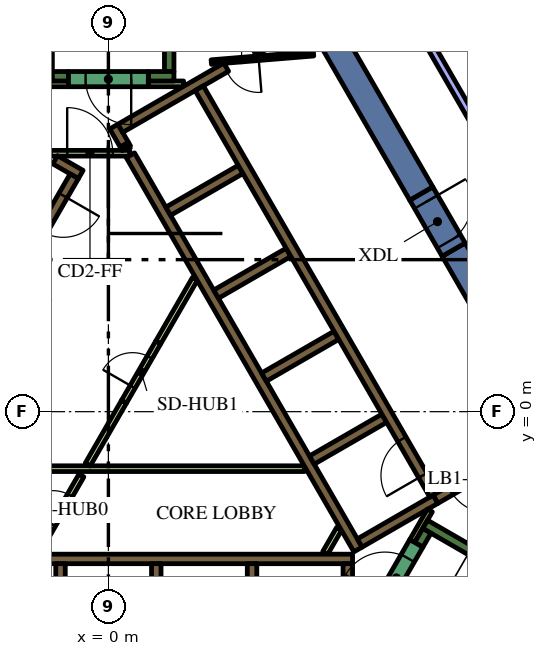
"""IFC4 building model, lengths in metres.
Left out: names, types, materials, properties, quantities, classifications, styles, units other than length and angle.
Written with IfcOpenShell. Run it as: python <this file> out.ifc"""

import sys

from ifc_helpers import new_model, si_unit, direction, frame, frame_2d, origin, place, context, subcontext, project, spatial, rectangle, extrude, element, fill, save


model = new_model("IFC4")
c1 = context("Model", 3, precision=1e-05, world=origin(), true_north=direction((0.0, 1.0)))
c2 = subcontext(c1, "Body", "Model", "MODEL_VIEW")
j1 = project(units=[si_unit("LENGTHUNIT", "METRE"), si_unit("PLANEANGLEUNIT", "RADIAN")], contexts=[c1])
p1 = place(None, origin())
s1 = spatial("IfcSite", under=j1, at=p1, CompositionType="ELEMENT")
p2 = place(p1, origin())
s2 = spatial("IfcBuilding", under=s1, at=p2, CompositionType="ELEMENT")
p3 = place(p2, frame((0.0, 0.0, 247.8)))
s3 = spatial("IfcBuildingStorey", under=s2, at=p3, CompositionType="ELEMENT", Elevation=247.8)
for number, where, z_axis, x_axis in (
    (1, (9.085, 4.264, 0.0), (0.0, 0.0, 1.0), (0.5, -0.866, 0.0)),
    (2, (8.235, 5.736, 0.0), (0.0, 0.0, 1.0), (-0.5, 0.866, 0.0)),
):
    element("IfcWall", number, at=place(p3, frame(where, z_axis=z_axis, x_axis=x_axis)), inside=s3, PredefinedType="SOLIDWALL", context=c2, shape_type="SweptSolid", body=[
        extrude(rectangle(XDim=12.472, YDim=0.7, at=frame_2d((6.236, 0.0))), origin(), (0.0, 0.0, 1.0), 4.2),
    ])
p4 = place(p3, frame((8.334, -2.964, 0.0), z_axis=(0.0, 0.0, 1.0), x_axis=(0.866016039709, -0.500016218704, 0.0)))
e3 = element("IfcWall", 3, at=p4, inside=s3, PredefinedType="SOLIDWALL", context=c2, shape_type="SweptSolid", body=[
    extrude(rectangle(XDim=7.05, YDim=0.25, at=frame_2d((3.525, 0.0))), origin(), (0.0, 0.0, 1.0), 4.2),
])
p5 = place(p3, frame((8.168, -3.503, 0.0), z_axis=(0.0, 0.0, 1.0), x_axis=(0.49972245349, 0.866185586049, 0.0)))
e4 = element("IfcWall", 4, at=p5, inside=s3, PredefinedType="SOLIDWALL", context=c2, shape_type="SweptSolid", body=[
    extrude(rectangle(XDim=0.425, YDim=0.25, at=frame_2d((0.212, 0.0))), origin(), (0.0, 0.0, 1.0), 4.2),
])
p6 = place(p3, frame((1.6, 8.95, 0.0), z_axis=(0.0, 0.0, 1.0), x_axis=(0.0, 1.0, 0.0)))
e5 = element("IfcWall", 5, at=p6, inside=s3, PredefinedType="SOLIDWALL", context=c2, shape_type="SweptSolid", body=[
    extrude(rectangle(XDim=6.8, YDim=0.25, at=frame_2d((3.4, 0.0))), origin(), (0.0, 0.0, 1.0), 4.2),
])
p7 = place(p3, frame((1.05, 8.825, 0.0), z_axis=(0.0, 0.0, 1.0), x_axis=(1.0, 0.0, 0.0)))
e6 = element("IfcWall", 6, at=p7, inside=s3, PredefinedType="SOLIDWALL", context=c2, shape_type="SweptSolid", body=[
    extrude(rectangle(XDim=0.675, YDim=0.25, at=frame_2d((0.337, 0.0))), origin(), (0.0, 0.0, 1.0), 4.2),
])
p8 = place(p3, frame((-1.6, 8.7, 0.0), z_axis=(0.0, 0.0, 1.0), x_axis=(0.0, 1.0, 0.0)))
e7 = element("IfcWall", 7, at=p8, inside=s3, PredefinedType="SOLIDWALL", context=c2, shape_type="SweptSolid", body=[
    extrude(rectangle(XDim=7.05, YDim=0.25, at=frame_2d((3.525, 0.0))), origin(), (0.0, 0.0, 1.0), 4.2),
])
p9 = place(p3, frame((-1.475, 8.825, 0.0), z_axis=(0.0, 0.0, 1.0), x_axis=(1.0, 0.0, 0.0)))
e8 = element("IfcWall", 8, at=p9, inside=s3, PredefinedType="SOLIDWALL", context=c2, shape_type="SweptSolid", body=[
    extrude(rectangle(XDim=0.425, YDim=0.25, at=frame_2d((0.212, 0.0))), origin(), (0.0, 0.0, 1.0), 4.2),
])
p10 = place(p3, frame((-5.545, -3.875, 0.0), z_axis=(0.0, 0.0, 1.0), x_axis=(1.0, 0.0, 0.0)))
e9 = element("IfcWall", 9, at=p10, inside=s3, PredefinedType="SOLIDWALL", context=c2, shape_type="SweptSolid", body=[
    extrude(rectangle(XDim=11.97, YDim=0.25, at=frame_2d((5.985, 0.0))), origin(), (0.0, 0.0, 1.0), 4.2),
])
p11 = place(p3, frame((6.3, -7.24, 0.0), z_axis=(0.0, 0.0, 1.0), x_axis=(0.0, 1.0, 0.0)))
e10 = element("IfcWall", 10, at=p11, inside=s3, PredefinedType="SOLIDWALL", context=c2, shape_type="SweptSolid", body=[
    extrude(rectangle(XDim=3.24, YDim=0.25, at=frame_2d((1.62, 0.0))), origin(), (0.0, 0.0, 1.0), 4.2),
])
for number, where, z_axis, x_axis in (
    (11, (3.78, -4.0, 0.0), (0.0, 0.0, 1.0), (0.0, -1.0, 0.0)),
    (12, (1.26, -4.0, 0.0), (0.0, 0.0, 1.0), (0.0, -1.0, 0.0)),
    (13, (-1.26, -4.0, 0.0), (0.0, 0.0, 1.0), (0.0, -1.0, 0.0)),
):
    element("IfcWall", number, at=place(p3, frame(where, z_axis=z_axis, x_axis=x_axis)), inside=s3, PredefinedType="SOLIDWALL", context=c2, shape_type="SweptSolid", body=[
        extrude(rectangle(XDim=2.2, YDim=0.25, at=frame_2d((1.1, 0.0))), origin(), (0.0, 0.0, 1.0), 4.2),
    ])
p12 = place(p3, frame((0.473, 6.93, 0.0), z_axis=(0.0, 0.0, 1.0), x_axis=(-0.49972245349, 0.866185586049, 0.0)))
e14 = element("IfcWall", 14, at=p12, inside=s3, PredefinedType="SOLIDWALL", context=c2, shape_type="SweptSolid", body=[
    extrude(rectangle(XDim=0.11, YDim=0.25, at=frame_2d((0.055, 0.0))), origin(), (0.0, 0.0, 1.0), 4.2),
])
p13 = place(p3, frame((6.568, -3.627, 0.0), z_axis=(0.0, 0.0, 1.0), x_axis=(-0.499999455981, 0.866025717874, 0.0)))
e15 = element("IfcWall", 15, at=p13, inside=s3, PredefinedType="SOLIDWALL", context=c2, shape_type="SweptSolid", body=[
    extrude(rectangle(XDim=11.978, YDim=0.25, at=frame_2d((5.989, 0.0))), origin(), (0.0, 0.0, 1.0), 4.2),
])
p14 = place(p3, frame((0.417, 7.027, 0.0), z_axis=(0.0, 0.0, 1.0), x_axis=(-0.500210807569, 0.865903659763, 0.0)))
e16 = element("IfcWall", 16, at=p14, inside=s3, PredefinedType="SOLIDWALL", context=c2, shape_type="SweptSolid", body=[
    extrude(rectangle(XDim=0.548, YDim=0.25, at=frame_2d((0.274, 0.0))), origin(), (0.0, 0.0, 1.0), 4.2),
])
p15 = place(p3, frame((3.1, 9.064, 0.0), z_axis=(0.0, 0.0, 1.0), x_axis=(-0.866030133475, -0.499991807846, 0.0)))
e17 = element("IfcWall", 17, at=p15, inside=s3, PredefinedType="SOLIDWALL", context=c2, shape_type="SweptSolid", body=[
    extrude(rectangle(XDim=3.217, YDim=0.25, at=frame_2d((1.608, 0.0))), origin(), (0.0, 0.0, 1.0), 4.2),
])
p16 = place(p3, frame((1.574, 5.274, 0.0), z_axis=(0.0, 0.0, 1.0), x_axis=(0.866028486751, 0.499994660107, 0.0)))
e18 = element("IfcWall", 18, at=p16, inside=s3, PredefinedType="SOLIDWALL", context=c2, shape_type="SweptSolid", body=[
    extrude(rectangle(XDim=2.2, YDim=0.25, at=frame_2d((1.1, 0.0))), origin(), (0.0, 0.0, 1.0), 4.2),
])
for number, where, z_axis, x_axis in (
    (19, (2.834, 3.091, 0.0), (0.0, 0.0, 1.0), (0.866, 0.5, 0.0)),
    (20, (4.094, 0.909, 0.0), (0.0, 0.0, 1.0), (0.866, 0.5, 0.0)),
    (21, (5.354, -1.274, 0.0), (0.0, 0.0, 1.0), (0.866, 0.5, 0.0)),
):
    element("IfcWall", number, at=place(p3, frame(where, z_axis=z_axis, x_axis=x_axis)), inside=s3, PredefinedType="SOLIDWALL", context=c2, shape_type="SweptSolid", body=[
        extrude(rectangle(XDim=2.2, YDim=0.25, at=frame_2d((1.1, 0.0))), origin(), (0.0, 0.0, 1.0), 4.2),
    ])
p17 = place(p3, frame((6.614, -3.456, 0.0), z_axis=(0.0, 0.0, 1.0), x_axis=(0.866025089694, 0.500000544019, 0.0)))
e22 = element("IfcWall", 22, at=p17, inside=s3, PredefinedType="SOLIDWALL", context=c2, shape_type="SweptSolid", body=[
    extrude(rectangle(XDim=2.305, YDim=0.25, at=frame_2d((1.153, 0.0))), origin(), (0.0, 0.0, 1.0), 4.2),
])
p18 = place(p3, frame((3.83, 9.486, 0.0), z_axis=(0.0, 0.0, 1.0), x_axis=(0.865986202621, 0.500067892261, 0.0)))
e23 = element("IfcWall", 23, at=p18, inside=s3, PredefinedType="SOLIDWALL", context=c2, shape_type="SweptSolid", body=[
    extrude(rectangle(XDim=1.591, YDim=0.25, at=frame_2d((0.795, 0.0))), origin(), (0.0, 0.0, 1.0), 4.2),
])
p19 = place(p3, frame((-0.728, 6.24, 0.0), z_axis=(0.0, 0.0, 1.0), x_axis=(-0.865955664968, 0.500120771724, 0.0)))
e24 = element("IfcWall", 24, at=p19, inside=s3, PredefinedType="SOLIDWALL", context=c2, shape_type="SweptSolid", body=[
    extrude(rectangle(XDim=0.778, YDim=0.25, at=frame_2d((0.389, 0.0))), origin(), (0.0, 0.0, 1.0), 4.2),
])
p20 = place(p3, frame((1.05, 8.625, 0.0), z_axis=(0.0, 0.0, 1.0), x_axis=(1.0, 0.0, 0.0)))
e25 = element("IfcWall", 25, at=p20, inside=s3, PredefinedType="PARTITIONING", context=c2, shape_type="SweptSolid", body=[
    extrude(rectangle(XDim=0.929, YDim=0.15, at=frame_2d((0.464, 0.0))), origin(), (0.0, 0.0, 1.0), 3.45),
])
p21 = place(p3, frame((-1.564, 8.625, 0.0), z_axis=(0.0, 0.0, 1.0), x_axis=(1.0, 0.0, 0.0)))
e26 = element("IfcWall", 26, at=p21, inside=s3, PredefinedType="PARTITIONING", context=c2, shape_type="SweptSolid", body=[
    extrude(rectangle(XDim=0.514, YDim=0.15, at=frame_2d((0.257, 0.0))), origin(), (0.0, 0.0, 1.0), 3.45),
])
p22 = place(p3, frame((8.459, -2.599, 0.0), z_axis=(0.0, 0.0, 1.0), x_axis=(-0.500041054325, -0.866001699761, 0.0)))
e27 = element("IfcWall", 27, at=p22, inside=s3, PredefinedType="PARTITIONING", context=c2, shape_type="SweptSolid", body=[
    extrude(rectangle(XDim=0.929, YDim=0.15, at=frame_2d((0.464, 0.0))), origin(), (0.0, 0.0, 1.0), 4.2),
])
p23 = place(p3, frame((5.705, -3.718, 0.0), z_axis=(0.0, 0.0, 1.0), x_axis=(0.499962090823, 0.866047289552, 0.0)))
e28 = element("IfcWall", 28, at=p23, inside=s3, PredefinedType="PARTITIONING", context=c2, shape_type="SweptSolid", body=[
    extrude(rectangle(XDim=0.735, YDim=0.15, at=frame_2d((0.367, 0.0))), origin(), (0.0, 0.0, 1.0), 3.45),
])
p24 = place(p3, frame((-4.2, -1.5, 0.0), z_axis=(0.0, 0.0, 1.0), x_axis=(1.0, 0.0, 0.0)))
e29 = element("IfcWall", 29, at=p24, inside=s3, PredefinedType="PARTITIONING", context=c2, shape_type="SweptSolid", body=[
    extrude(rectangle(XDim=9.359, YDim=0.15, at=frame_2d((4.68, 0.0))), origin(), (0.0, 0.0, 1.0), 3.45),
])
p25 = place(p3, frame((-0.544, -1.393, 0.0), z_axis=(0.0, 0.0, 1.0), x_axis=(0.499928740635, 0.866066541489, 0.0)))
e30 = element("IfcWall", 30, at=p25, inside=s3, PredefinedType="PARTITIONING", context=c2, shape_type="SweptSolid", body=[
    extrude(rectangle(XDim=1.912, YDim=0.15, at=frame_2d((0.956, 0.0))), origin(), (0.0, 0.0, 1.0), 3.45),
])
p26 = place(p3, frame((1.312, 1.822, 0.0), z_axis=(0.0, 0.0, 1.0), x_axis=(0.500003549559, 0.866023354436, 0.0)))
e31 = element("IfcWall", 31, at=p26, inside=s3, PredefinedType="PARTITIONING", context=c2, shape_type="SweptSolid", body=[
    extrude(rectangle(XDim=1.93, YDim=0.15, at=frame_2d((0.965, 0.0))), origin(), (0.0, 0.0, 1.0), 3.45),
])
p27 = place(p3, frame((8.565, -2.185, 0.0), z_axis=(0.0, 0.0, 1.0), x_axis=(-0.499997954832, 0.866026584559, 0.0)))
e32 = element("IfcWall", 32, at=p27, inside=s3, PredefinedType="SOLIDWALL", context=c2, shape_type="SweptSolid", body=[
    extrude(rectangle(XDim=12.35, YDim=0.25, at=frame_2d((6.175, 0.0))), origin(), (0.0, 0.0, 1.0), 4.2),
])
p28 = place(p27, frame((0.585, 0.0, 0.0)))
e33 = element("IfcOpeningElement", 33, at=p28, cuts=e32, PredefinedType="OPENING", context=c2, shape_type="SweptSolid", body=[
    extrude(rectangle(XDim=1.1, YDim=2.1, at=frame_2d((0.55, 1.05))), frame((0.0, 0.135, 0.0), z_axis=(0.0, -1.0, 0.0), x_axis=(1.0, 0.0, 0.0)), (0.0, 0.0, 1.0), 0.27),
])
p29 = place(p3, frame((-0.898, 6.194, 0.0), z_axis=(0.0, 0.0, 1.0), x_axis=(-0.499996202215, -0.866027596426, 0.0)))
e34 = element("IfcWall", 34, at=p29, inside=s3, PredefinedType="SOLIDWALL", context=c2, shape_type="SweptSolid", body=[
    extrude(rectangle(XDim=9.83, YDim=0.25, at=frame_2d((4.915, 0.0))), origin(), (0.0, 0.0, 1.0), 4.2),
])
p30 = place(p29, frame((0.585, 0.0, 0.0)))
e35 = element("IfcOpeningElement", 35, at=p30, cuts=e34, PredefinedType="OPENING", context=c2, shape_type="SweptSolid", body=[
    extrude(rectangle(XDim=1.1, YDim=2.1, at=frame_2d((0.55, 1.05))), frame((0.0, 0.135, 0.0), z_axis=(0.0, -1.0, 0.0), x_axis=(1.0, 0.0, 0.0)), (0.0, 0.0, 1.0), 0.27),
])
p31 = place(p29, frame((3.105, 0.0, 0.0)))
e36 = element("IfcOpeningElement", 36, at=p31, cuts=e34, PredefinedType="OPENING", context=c2, shape_type="SweptSolid", body=[
    extrude(rectangle(XDim=1.1, YDim=2.1, at=frame_2d((0.55, 1.05))), frame((0.0, 0.135, 0.0), z_axis=(0.0, -1.0, 0.0), x_axis=(1.0, 0.0, 0.0)), (0.0, 0.0, 1.0), 0.27),
])
p32 = place(p29, frame((5.625, 0.0, 0.0)))
e37 = element("IfcOpeningElement", 37, at=p32, cuts=e34, PredefinedType="OPENING", context=c2, shape_type="SweptSolid", body=[
    extrude(rectangle(XDim=1.1, YDim=2.1, at=frame_2d((0.55, 1.05))), frame((0.0, 0.135, 0.0), z_axis=(0.0, -1.0, 0.0), x_axis=(1.0, 0.0, 0.0)), (0.0, 0.0, 1.0), 0.27),
])
p33 = place(p29, frame((8.145, 0.0, 0.0)))
e38 = element("IfcOpeningElement", 38, at=p33, cuts=e34, PredefinedType="OPENING", context=c2, shape_type="SweptSolid", body=[
    extrude(rectangle(XDim=1.1, YDim=2.1, at=frame_2d((0.55, 1.05))), frame((0.0, 0.135, 0.0), z_axis=(0.0, -1.0, 0.0), x_axis=(1.0, 0.0, 0.0)), (0.0, 0.0, 1.0), 0.27),
])
p34 = place(p3, frame((7.053, -5.284, 0.0), z_axis=(0.0, 0.0, 1.0), x_axis=(0.500078061341, 0.865980330357, 0.0)))
e39 = element("IfcWall", 39, at=p34, inside=s3, PredefinedType="SOLIDWALL", context=c2, shape_type="SweptSolid", body=[
    extrude(rectangle(XDim=2.1, YDim=0.4, at=frame_2d((1.05, 0.0))), origin(), (0.0, 0.0, 1.0), 4.2),
])
p35 = place(p34, frame((0.45, 0.0, 0.0)))
e40 = element("IfcOpeningElement", 40, at=p35, cuts=e39, PredefinedType="OPENING", context=c2, shape_type="SweptSolid", body=[
    extrude(rectangle(XDim=1.2, YDim=2.1, at=frame_2d((0.6, 1.05))), frame((0.0, 0.21, 0.0), z_axis=(0.0, -1.0, 0.0), x_axis=(1.0, 0.0, 0.0)), (0.0, 0.0, 1.0), 0.42),
])
p36 = place(p3, frame((1.05, 8.75, 0.0), z_axis=(0.0, 0.0, 1.0), x_axis=(-1.0, 0.0, 0.0)))
e41 = element("IfcWall", 41, at=p36, inside=s3, PredefinedType="SOLIDWALL", context=c2, shape_type="SweptSolid", body=[
    extrude(rectangle(XDim=2.1, YDim=0.4, at=frame_2d((1.05, 0.0))), origin(), (0.0, 0.0, 1.0), 4.2),
])
p37 = place(p36, frame((0.45, 0.0, 0.0)))
e42 = element("IfcOpeningElement", 42, at=p37, cuts=e41, PredefinedType="OPENING", context=c2, shape_type="SweptSolid", body=[
    extrude(rectangle(XDim=1.2, YDim=2.1, at=frame_2d((0.6, 1.05))), frame((0.0, 0.21, 0.0), z_axis=(0.0, -1.0, 0.0), x_axis=(1.0, 0.0, 0.0)), (0.0, 0.0, 1.0), 0.42),
])
p38 = place(p3, frame((5.398, 9.419, 0.0), z_axis=(0.0, 0.0, 1.0), x_axis=(-0.996653416376, -0.081743303248, 0.0)))
e43 = element("IfcWall", 43, at=p38, inside=s3, PredefinedType="PARTITIONING", context=c2, shape_type="SweptSolid", body=[
    extrude(rectangle(XDim=2.7, YDim=0.12, at=frame_2d((1.35, 0.0))), origin(), (0.0, 0.0, 1.0), 3.45),
])
p39 = place(p38, frame((1.45, 0.0, 0.0)))
e44 = element("IfcOpeningElement", 44, at=p39, cuts=e43, PredefinedType="OPENING", context=c2, shape_type="SweptSolid", body=[
    extrude(rectangle(XDim=0.9, YDim=2.1, at=frame_2d((0.45, 1.05))), frame((0.0, 0.07, 0.0), z_axis=(0.0, -1.0, 0.0), x_axis=(1.0, 0.0, 0.0)), (0.0, 0.0, 1.0), 0.14),
])
p40 = place(p3, frame((-1.76, -3.498, 0.0), z_axis=(0.0, 0.0, 1.0), x_axis=(0.499977374825, 0.866038466041, 0.0)))
e45 = element("IfcWall", 45, at=p40, inside=s3, PredefinedType="PARTITIONING", context=c2, shape_type="SweptSolid", body=[
    extrude(rectangle(XDim=2.1, YDim=0.15, at=frame_2d((1.05, 0.0))), origin(), (0.0, 0.0, 1.0), 3.45),
])
p41 = place(p40, frame((0.6, 0.0, 0.0)))
e46 = element("IfcOpeningElement", 46, at=p41, cuts=e45, PredefinedType="OPENING", context=c2, shape_type="SweptSolid", body=[
    extrude(rectangle(XDim=0.9, YDim=2.1, at=frame_2d((0.45, 1.05))), frame((0.0, 0.085, 0.0), z_axis=(0.0, -1.0, 0.0), x_axis=(1.0, 0.0, 0.0)), (0.0, 0.0, 1.0), 0.17),
])
p42 = place(p3, frame((-1.534, 6.8, 0.0), z_axis=(0.0, 0.0, 1.0), x_axis=(1.0, 0.0, 0.0)))
e47 = element("IfcWall", 47, at=p42, inside=s3, PredefinedType="PARTITIONING", context=c2, shape_type="SweptSolid", body=[
    extrude(rectangle(XDim=2.1, YDim=0.15, at=frame_2d((1.05, 0.0))), origin(), (0.0, 0.0, 1.0), 3.45),
])
p43 = place(p42, frame((0.45, 0.0, 0.0)))
e48 = element("IfcOpeningElement", 48, at=p43, cuts=e47, PredefinedType="OPENING", context=c2, shape_type="SweptSolid", body=[
    extrude(rectangle(XDim=1.2, YDim=2.1, at=frame_2d((0.6, 1.05))), frame((0.0, 0.085, 0.0), z_axis=(0.0, -1.0, 0.0), x_axis=(1.0, 0.0, 0.0)), (0.0, 0.0, 1.0), 0.17),
])
p44 = place(p3, frame((10.429, -1.253, 0.0), z_axis=(0.0, 0.0, 1.0), x_axis=(-0.866009402589, -0.500027713859, 0.0)))
e49 = element("IfcWall", 49, at=p44, inside=s3, PredefinedType="SOLIDWALL", context=c2, shape_type="SweptSolid", body=[
    extrude(rectangle(XDim=2.1, YDim=0.25, at=frame_2d((1.05, 0.0))), origin(), (0.0, 0.0, 1.0), 4.2),
])
p45 = place(p44, frame((0.45, 0.0, 0.0)))
e50 = element("IfcOpeningElement", 50, at=p45, cuts=e49, PredefinedType="OPENING", context=c2, shape_type="SweptSolid", body=[
    extrude(rectangle(XDim=1.2, YDim=2.1, at=frame_2d((0.6, 1.05))), frame((0.0, 0.135, 0.0), z_axis=(0.0, -1.0, 0.0), x_axis=(1.0, 0.0, 0.0)), (0.0, 0.0, 1.0), 0.27),
])
p46 = place(p3, frame((8.235, 5.736, 0.0), z_axis=(0.0, 0.0, 1.0), x_axis=(0.499954529098, -0.86605165483, 0.0)))
e51 = element("IfcWall", 51, at=p46, inside=s3, PredefinedType="SOLIDWALL", context=c2, shape_type="SweptSolid", body=[
    extrude(rectangle(XDim=1.7, YDim=0.7, at=frame_2d((0.85, 0.0))), origin(), (0.0, 0.0, 1.0), 4.2),
])
p47 = place(p46, frame((0.25, 0.0, 0.0)))
e52 = element("IfcOpeningElement", 52, at=p47, cuts=e51, PredefinedType="OPENING", context=c2, shape_type="SweptSolid", body=[
    extrude(rectangle(XDim=1.2, YDim=2.1, at=frame_2d((0.6, 1.05))), frame((0.0, 0.36, 0.0), z_axis=(0.0, -1.0, 0.0), x_axis=(1.0, 0.0, 0.0)), (0.0, 0.0, 1.0), 0.72),
])
p48 = place(p3, frame((0.412, 0.263, 0.0), z_axis=(0.0, 0.0, 1.0), x_axis=(0.500062916607, 0.865989075817, 0.0)))
e53 = element("IfcWall", 53, at=p48, inside=s3, PredefinedType="PARTITIONING", context=c2, shape_type="SweptSolid", body=[
    extrude(rectangle(XDim=1.8, YDim=0.15, at=frame_2d((0.9, 0.0))), origin(), (0.0, 0.0, 1.0), 3.45),
])
p49 = place(p48, frame((0.45, 0.0, 0.0)))
e54 = element("IfcOpeningElement", 54, at=p49, cuts=e53, PredefinedType="OPENING", context=c2, shape_type="SweptSolid", body=[
    extrude(rectangle(XDim=0.9, YDim=2.1, at=frame_2d((0.45, 1.05))), frame((0.0, 0.085, 0.0), z_axis=(0.0, -1.0, 0.0), x_axis=(1.0, 0.0, 0.0)), (0.0, 0.0, 1.0), 0.17),
])
p50 = place(p3, frame((13.681, 0.604, 0.0), z_axis=(0.0, 0.0, 1.0), x_axis=(-0.500001759768, 0.86602438778, 0.0)))
e55 = element("IfcWall", 55, at=p50, inside=s3, PredefinedType="PARTITIONING", context=c2, shape_type="SweptSolid", body=[
    extrude(rectangle(XDim=13.317, YDim=0.2, at=frame_2d((6.658, 0.0))), origin(), (0.0, 0.0, 1.0), 3.45),
])
p51 = place(p50, frame((6.2, 0.0, 0.0)))
e56 = element("IfcOpeningElement", 56, at=p51, cuts=e55, PredefinedType="OPENING", context=c2, shape_type="SweptSolid", body=[
    extrude(rectangle(XDim=1.0, YDim=2.1, at=frame_2d((0.5, 1.05))), frame((0.0, 0.11, 0.0), z_axis=(0.0, -1.0, 0.0), x_axis=(1.0, 0.0, 0.0)), (0.0, 0.0, 1.0), 0.22),
])
p52 = place(p28, origin())
e57 = element("IfcDoor", 57, at=p52, inside=s3, OperationType="DOUBLE_DOOR_SLIDING", PredefinedType="DOOR", context=c2, shape_type="SweptSolid", body=[
    extrude(rectangle(XDim=1.1, YDim=2.1, at=frame_2d((0.55, 1.05))), frame((0.0, 0.025, 0.0), z_axis=(0.0, -1.0, 0.0), x_axis=(1.0, 0.0, 0.0)), (0.0, 0.0, 1.0), 0.05),
])
fill(e33, e57)
p53 = place(p30, origin())
e58 = element("IfcDoor", 58, at=p53, inside=s3, OperationType="DOUBLE_DOOR_SLIDING", PredefinedType="DOOR", context=c2, shape_type="SweptSolid", body=[
    extrude(rectangle(XDim=1.1, YDim=2.1, at=frame_2d((0.55, 1.05))), frame((0.0, 0.025, 0.0), z_axis=(0.0, -1.0, 0.0), x_axis=(1.0, 0.0, 0.0)), (0.0, 0.0, 1.0), 0.05),
])
fill(e35, e58)
p54 = place(p35, origin())
e59 = element("IfcDoor", 59, at=p54, inside=s3, OperationType="SINGLE_SWING_LEFT", PredefinedType="DOOR", context=c2, shape_type="SweptSolid", body=[
    extrude(rectangle(XDim=1.2, YDim=2.1, at=frame_2d((0.6, 1.05))), frame((0.0, 0.025, 0.0), z_axis=(0.0, -1.0, 0.0), x_axis=(1.0, 0.0, 0.0)), (0.0, 0.0, 1.0), 0.05),
])
fill(e40, e59)
p55 = place(p37, origin())
e60 = element("IfcDoor", 60, at=p55, inside=s3, OperationType="SINGLE_SWING_LEFT", PredefinedType="DOOR", context=c2, shape_type="SweptSolid", body=[
    extrude(rectangle(XDim=1.2, YDim=2.1, at=frame_2d((0.6, 1.05))), frame((0.0, 0.025, 0.0), z_axis=(0.0, -1.0, 0.0), x_axis=(1.0, 0.0, 0.0)), (0.0, 0.0, 1.0), 0.05),
])
fill(e42, e60)
p56 = place(p39, origin())
e61 = element("IfcDoor", 61, at=p56, inside=s3, OperationType="SINGLE_SWING_LEFT", PredefinedType="DOOR", context=c2, shape_type="SweptSolid", body=[
    extrude(rectangle(XDim=0.9, YDim=2.1, at=frame_2d((0.45, 1.05))), frame((0.0, 0.025, 0.0), z_axis=(0.0, -1.0, 0.0), x_axis=(1.0, 0.0, 0.0)), (0.0, 0.0, 1.0), 0.05),
])
fill(e44, e61)
p57 = place(p41, origin())
e62 = element("IfcDoor", 62, at=p57, inside=s3, OperationType="SINGLE_SWING_LEFT", PredefinedType="DOOR", context=c2, shape_type="SweptSolid", body=[
    extrude(rectangle(XDim=0.9, YDim=2.1, at=frame_2d((0.45, 1.05))), frame((0.0, 0.025, 0.0), z_axis=(0.0, -1.0, 0.0), x_axis=(1.0, 0.0, 0.0)), (0.0, 0.0, 1.0), 0.05),
])
fill(e46, e62)
p58 = place(p43, origin())
e63 = element("IfcDoor", 63, at=p58, inside=s3, OperationType="SINGLE_SWING_LEFT", PredefinedType="DOOR", context=c2, shape_type="SweptSolid", body=[
    extrude(rectangle(XDim=1.2, YDim=2.1, at=frame_2d((0.6, 1.05))), frame((0.0, 0.025, 0.0), z_axis=(0.0, -1.0, 0.0), x_axis=(1.0, 0.0, 0.0)), (0.0, 0.0, 1.0), 0.05),
])
fill(e48, e63)
p59 = place(p45, origin())
e64 = element("IfcDoor", 64, at=p59, inside=s3, OperationType="SINGLE_SWING_LEFT", PredefinedType="DOOR", context=c2, shape_type="SweptSolid", body=[
    extrude(rectangle(XDim=1.2, YDim=2.1, at=frame_2d((0.6, 1.05))), frame((0.0, 0.025, 0.0), z_axis=(0.0, -1.0, 0.0), x_axis=(1.0, 0.0, 0.0)), (0.0, 0.0, 1.0), 0.05),
])
fill(e50, e64)
p60 = place(p47, origin())
e65 = element("IfcDoor", 65, at=p60, inside=s3, OperationType="SINGLE_SWING_LEFT", PredefinedType="DOOR", context=c2, shape_type="SweptSolid", body=[
    extrude(rectangle(XDim=1.2, YDim=2.1, at=frame_2d((0.6, 1.05))), frame((0.0, 0.025, 0.0), z_axis=(0.0, -1.0, 0.0), x_axis=(1.0, 0.0, 0.0)), (0.0, 0.0, 1.0), 0.05),
])
fill(e52, e65)
p61 = place(p49, origin())
e66 = element("IfcDoor", 66, at=p61, inside=s3, OperationType="SINGLE_SWING_LEFT", PredefinedType="DOOR", context=c2, shape_type="SweptSolid", body=[
    extrude(rectangle(XDim=0.9, YDim=2.1, at=frame_2d((0.45, 1.05))), frame((0.0, 0.025, 0.0), z_axis=(0.0, -1.0, 0.0), x_axis=(1.0, 0.0, 0.0)), (0.0, 0.0, 1.0), 0.05),
])
fill(e54, e66)
save(model, sys.argv[1])
